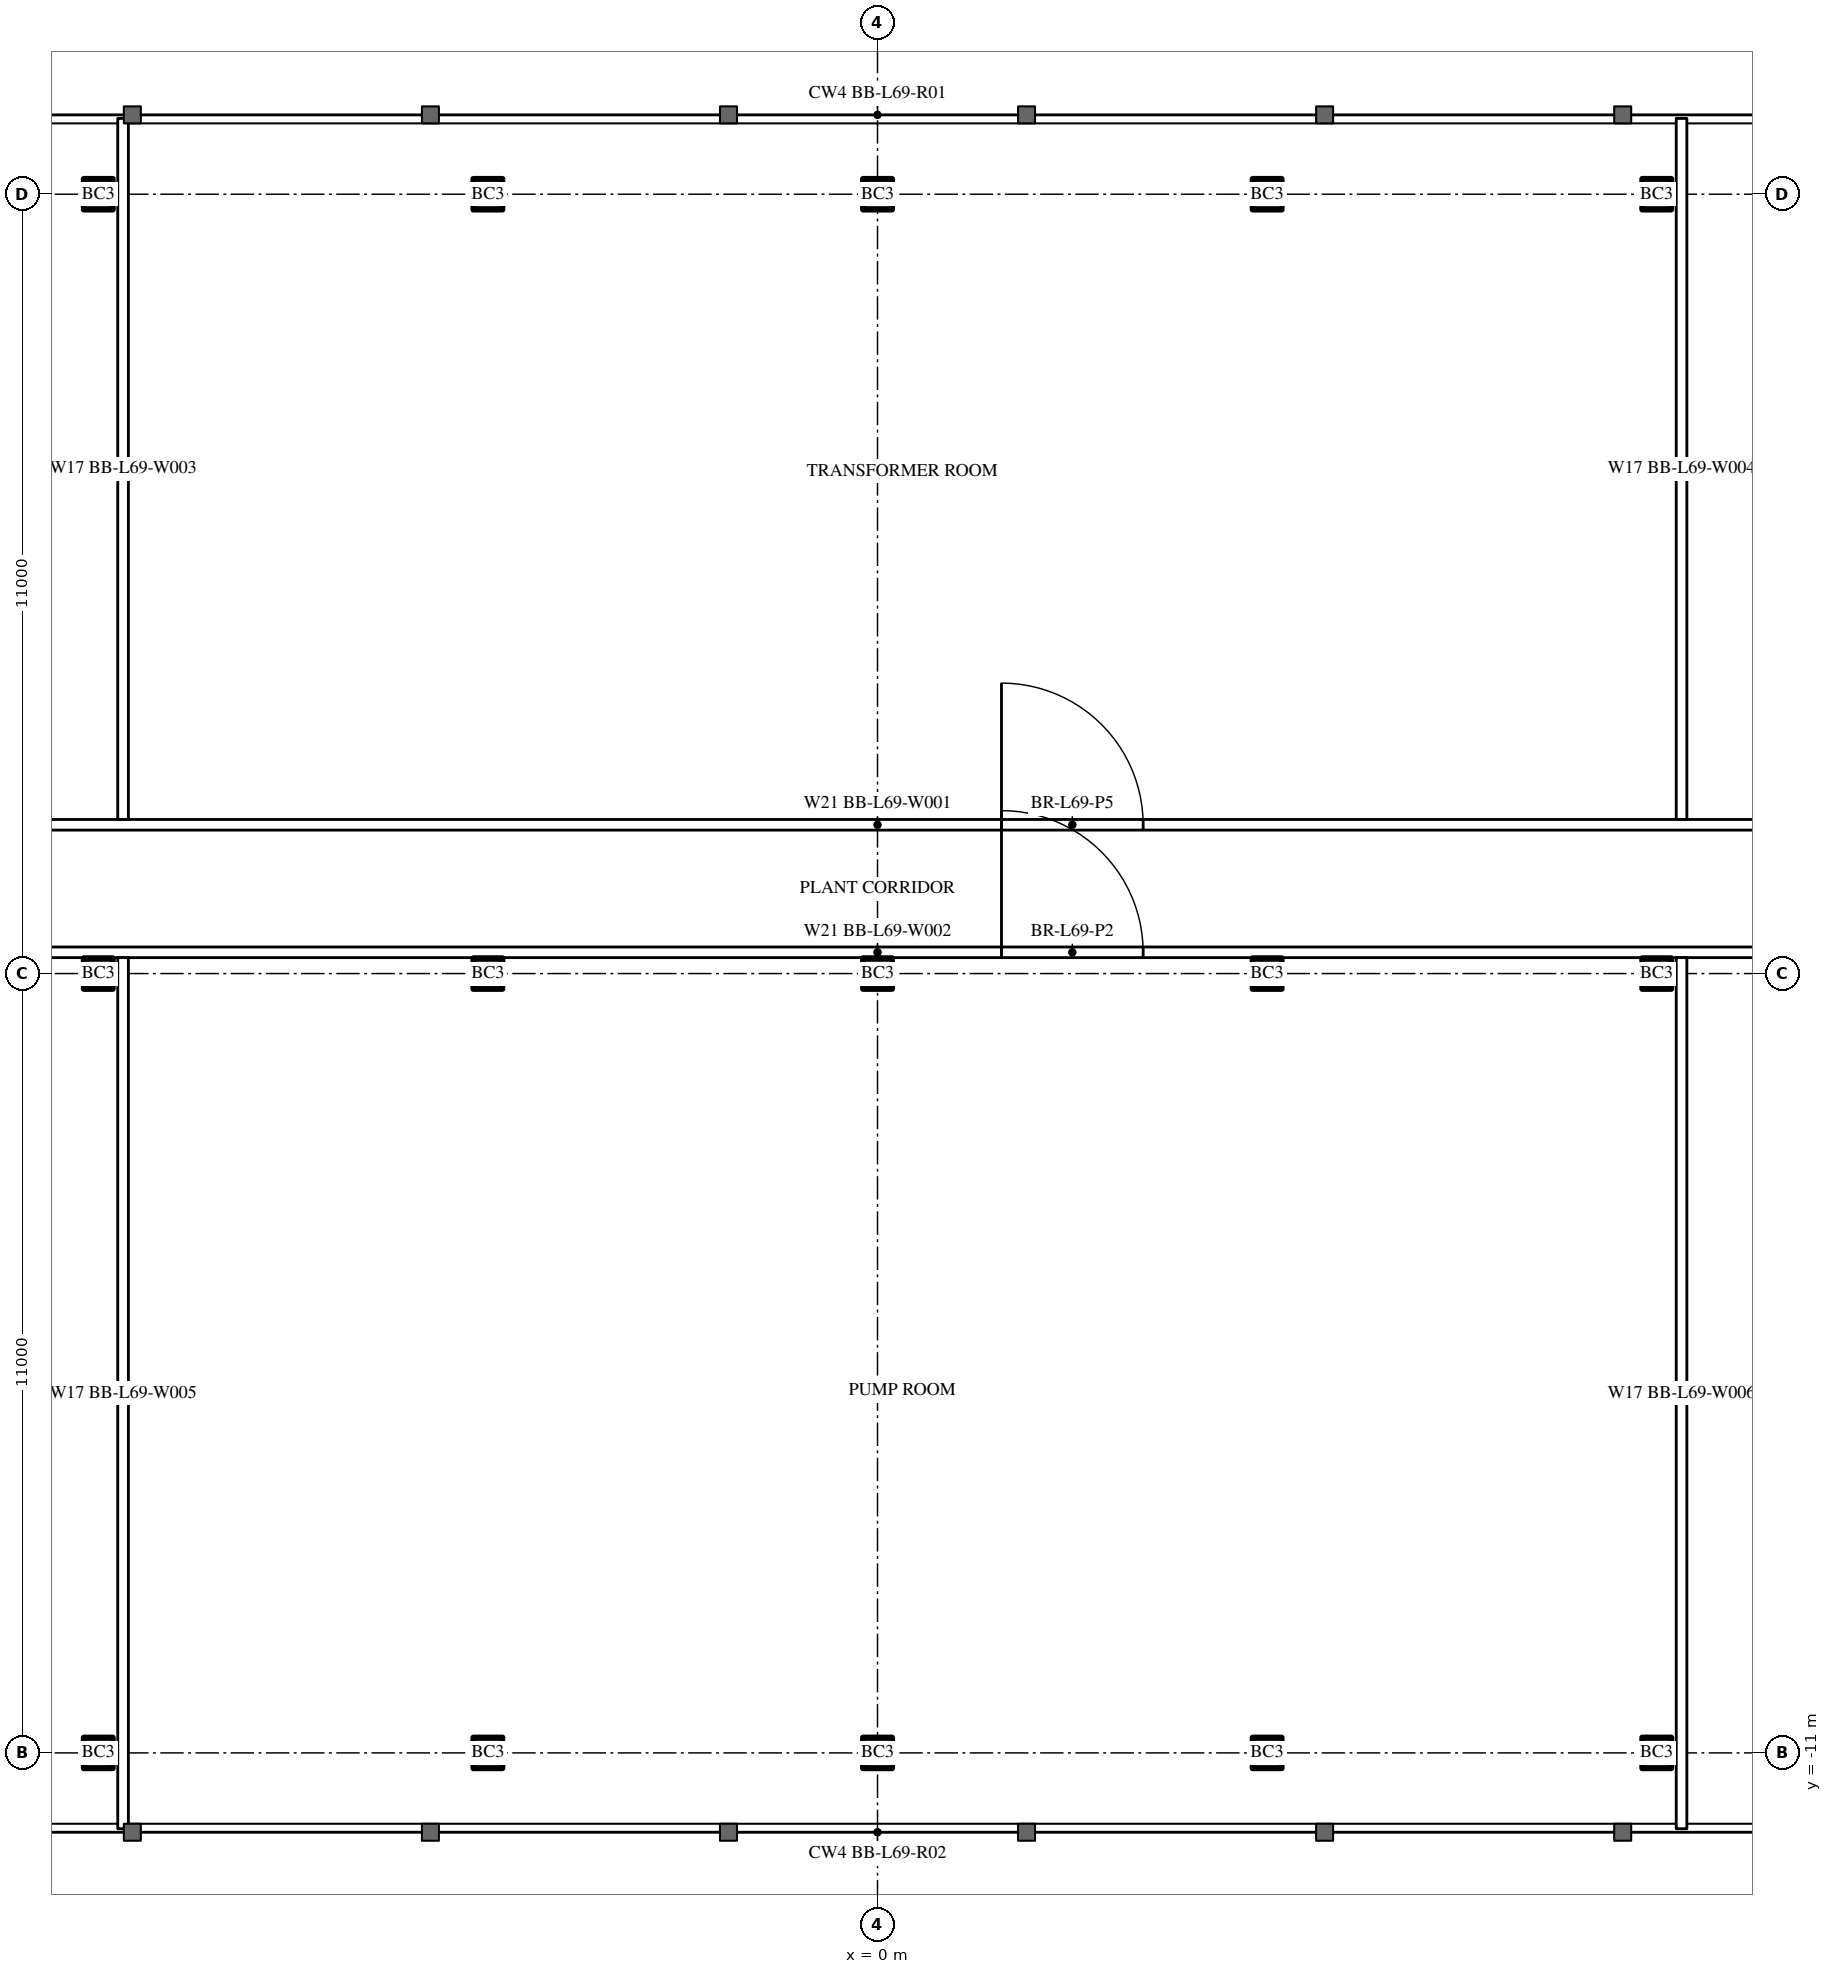
"""IFC4 building model, lengths in metres.
Left out: names, types, materials, properties, quantities, classifications, styles, units other than length and angle.
Written with IfcOpenShell. Run it as: python <this file> out.ifc"""

import sys

from ifc_helpers import new_model, si_unit, direction, frame, frame_2d, origin, origin_2d, place, context, subcontext, project, spatial, rectangle, i_section, extrude, element, fill, save


model = new_model("IFC4")
c1 = context("Model", 3, precision=1e-05, world=origin(), true_north=direction((0.0, 1.0)))
c2 = subcontext(c1, "Body", "Model", "MODEL_VIEW")
j1 = project(units=[si_unit("LENGTHUNIT", "METRE"), si_unit("PLANEANGLEUNIT", "RADIAN")], contexts=[c1])
p1 = place(None, origin())
s1 = spatial("IfcSite", under=j1, at=p1, CompositionType="ELEMENT")
p2 = place(p1, origin())
s2 = spatial("IfcBuilding", under=s1, at=p2, CompositionType="ELEMENT")
p3 = place(p2, frame((0.0, 0.0, 263.3)))
s3 = spatial("IfcBuildingStorey", under=s2, at=p3, CompositionType="ELEMENT", Elevation=263.3)
for number, where, z_axis, x_axis in (
    (1, (-11.0, -11.0, 0.0), (0.0, 0.0, 1.0), (1.0, 0.0, 0.0)),
    (2, (-5.5, -11.0, 0.0), (0.0, 0.0, 1.0), (1.0, 0.0, 0.0)),
    (3, (0.0, -11.0, 0.0), (0.0, 0.0, 1.0), (1.0, 0.0, 0.0)),
    (4, (5.5, -11.0, 0.0), (0.0, 0.0, 1.0), (1.0, 0.0, 0.0)),
    (5, (11.0, -11.0, 0.0), (0.0, 0.0, 1.0), (1.0, 0.0, 0.0)),
    (6, (-11.0, 0.0, 0.0), (0.0, 0.0, 1.0), (1.0, 0.0, 0.0)),
    (7, (-5.5, 0.0, 0.0), (0.0, 0.0, 1.0), (1.0, 0.0, 0.0)),
    (8, (0.0, 0.0, 0.0), (0.0, 0.0, 1.0), (1.0, 0.0, 0.0)),
    (9, (5.5, 0.0, 0.0), (0.0, 0.0, 1.0), (1.0, 0.0, 0.0)),
    (10, (11.0, 0.0, 0.0), (0.0, 0.0, 1.0), (1.0, 0.0, 0.0)),
    (11, (-11.0, 11.0, 0.0), (0.0, 0.0, 1.0), (1.0, 0.0, 0.0)),
    (12, (-5.5, 11.0, 0.0), (0.0, 0.0, 1.0), (1.0, 0.0, 0.0)),
    (13, (0.0, 11.0, 0.0), (0.0, 0.0, 1.0), (1.0, 0.0, 0.0)),
    (14, (5.5, 11.0, 0.0), (0.0, 0.0, 1.0), (1.0, 0.0, 0.0)),
    (15, (11.0, 11.0, 0.0), (0.0, 0.0, 1.0), (1.0, 0.0, 0.0)),
):
    element("IfcColumn", number, at=place(p3, frame(where, z_axis=z_axis, x_axis=x_axis)), inside=s3, PredefinedType="COLUMN", context=c2, shape_type="SweptSolid", body=[
        extrude(i_section(OverallWidth=0.412, OverallDepth=0.437, WebThickness=0.036, FlangeThickness=0.058, FilletRadius=0.015, at=origin_2d()), origin(), (0.0, 0.0, 1.0), 5.0),
    ])
p4 = place(p3, frame((-27.5, 0.3, 0.0), z_axis=(0.0, 0.0, 1.0), x_axis=(1.0, 0.0, 0.0)))
e16 = element("IfcWall", 16, at=p4, inside=s3, PredefinedType="PARTITIONING", context=c2, shape_type="SweptSolid", body=[
    extrude(rectangle(XDim=55.0, YDim=0.15, at=frame_2d((27.5, 0.0))), origin(), (0.0, 0.0, 1.0), 3.8),
])
p5 = place(p4, frame((7.25, 0.0, 0.0)))
e17 = element("IfcOpeningElement", 17, at=p5, cuts=e16, PredefinedType="OPENING", context=c2, shape_type="SweptSolid", body=[
    extrude(rectangle(XDim=2.0, YDim=2.4, at=frame_2d((1.0, 1.2))), frame((0.0, 0.085, 0.0), z_axis=(0.0, -1.0, 0.0), x_axis=(1.0, 0.0, 0.0)), (0.0, 0.0, 1.0), 0.17),
])
p6 = place(p4, frame((29.25, 0.0, 0.0)))
e18 = element("IfcOpeningElement", 18, at=p6, cuts=e16, PredefinedType="OPENING", context=c2, shape_type="SweptSolid", body=[
    extrude(rectangle(XDim=2.0, YDim=2.4, at=frame_2d((1.0, 1.2))), frame((0.0, 0.085, 0.0), z_axis=(0.0, -1.0, 0.0), x_axis=(1.0, 0.0, 0.0)), (0.0, 0.0, 1.0), 0.17),
])
p7 = place(p4, frame((45.75, 0.0, 0.0)))
e19 = element("IfcOpeningElement", 19, at=p7, cuts=e16, PredefinedType="OPENING", context=c2, shape_type="SweptSolid", body=[
    extrude(rectangle(XDim=2.0, YDim=2.4, at=frame_2d((1.0, 1.2))), frame((0.0, 0.085, 0.0), z_axis=(0.0, -1.0, 0.0), x_axis=(1.0, 0.0, 0.0)), (0.0, 0.0, 1.0), 0.17),
])
p8 = place(p3, frame((-27.5, 2.1, 0.0), z_axis=(0.0, 0.0, 1.0), x_axis=(1.0, 0.0, 0.0)))
e20 = element("IfcWall", 20, at=p8, inside=s3, PredefinedType="PARTITIONING", context=c2, shape_type="SweptSolid", body=[
    extrude(rectangle(XDim=55.0, YDim=0.15, at=frame_2d((27.5, 0.0))), origin(), (0.0, 0.0, 1.0), 4.8),
])
p9 = place(p8, frame((7.25, 0.0, 0.0)))
e21 = element("IfcOpeningElement", 21, at=p9, cuts=e20, PredefinedType="OPENING", context=c2, shape_type="SweptSolid", body=[
    extrude(rectangle(XDim=2.0, YDim=2.4, at=frame_2d((1.0, 1.2))), frame((0.0, 0.085, 0.0), z_axis=(0.0, -1.0, 0.0), x_axis=(1.0, 0.0, 0.0)), (0.0, 0.0, 1.0), 0.17),
])
p10 = place(p8, frame((29.25, 0.0, 0.0)))
e22 = element("IfcOpeningElement", 22, at=p10, cuts=e20, PredefinedType="OPENING", context=c2, shape_type="SweptSolid", body=[
    extrude(rectangle(XDim=2.0, YDim=2.4, at=frame_2d((1.0, 1.2))), frame((0.0, 0.085, 0.0), z_axis=(0.0, -1.0, 0.0), x_axis=(1.0, 0.0, 0.0)), (0.0, 0.0, 1.0), 0.17),
])
p11 = place(p8, frame((45.75, 0.0, 0.0)))
e23 = element("IfcOpeningElement", 23, at=p11, cuts=e20, PredefinedType="OPENING", context=c2, shape_type="SweptSolid", body=[
    extrude(rectangle(XDim=2.0, YDim=2.4, at=frame_2d((1.0, 1.2))), frame((0.0, 0.085, 0.0), z_axis=(0.0, -1.0, 0.0), x_axis=(1.0, 0.0, 0.0)), (0.0, 0.0, 1.0), 0.17),
])
for number, where, z_axis, x_axis in (
    (24, (-10.65, -12.07, 0.0), (0.0, 0.0, 1.0), (0.0, 1.0, 0.0)),
    (25, (11.35, -12.07, 0.0), (0.0, 0.0, 1.0), (0.0, 1.0, 0.0)),
):
    element("IfcWall", number, at=place(p3, frame(where, z_axis=z_axis, x_axis=x_axis)), inside=s3, PredefinedType="PARTITIONING", context=c2, shape_type="SweptSolid", body=[
        extrude(rectangle(XDim=12.295, YDim=0.15, at=frame_2d((6.147, 0.0))), origin(), (0.0, 0.0, 1.0), 4.8),
    ])
for number, where, z_axis, x_axis in (
    (26, (-10.65, 2.175, 0.0), (0.0, 0.0, 1.0), (0.0, 1.0, 0.0)),
    (27, (11.35, 2.175, 0.0), (0.0, 0.0, 1.0), (0.0, 1.0, 0.0)),
):
    element("IfcWall", number, at=place(p3, frame(where, z_axis=z_axis, x_axis=x_axis)), inside=s3, PredefinedType="PARTITIONING", context=c2, shape_type="SweptSolid", body=[
        extrude(rectangle(XDim=9.895, YDim=0.15, at=frame_2d((4.948, 0.0))), origin(), (0.0, 0.0, 1.0), 4.8),
    ])
p12 = place(p6, origin())
e28 = element("IfcDoor", 28, at=p12, inside=s3, OperationType="DOUBLE_DOOR_SINGLE_SWING", PredefinedType="DOOR", context=c2, shape_type="SweptSolid", body=[
    extrude(rectangle(XDim=2.0, YDim=2.4, at=frame_2d((1.0, 1.2))), frame((0.0, 0.025, 0.0), z_axis=(0.0, -1.0, 0.0), x_axis=(1.0, 0.0, 0.0)), (0.0, 0.0, 1.0), 0.05),
])
fill(e18, e28)
p13 = place(p10, origin())
e29 = element("IfcDoor", 29, at=p13, inside=s3, OperationType="DOUBLE_DOOR_SINGLE_SWING", PredefinedType="DOOR", context=c2, shape_type="SweptSolid", body=[
    extrude(rectangle(XDim=2.0, YDim=2.4, at=frame_2d((1.0, 1.2))), frame((0.0, 0.025, 0.0), z_axis=(0.0, -1.0, 0.0), x_axis=(1.0, 0.0, 0.0)), (0.0, 0.0, 1.0), 0.05),
])
fill(e22, e29)
save(model, sys.argv[1])
